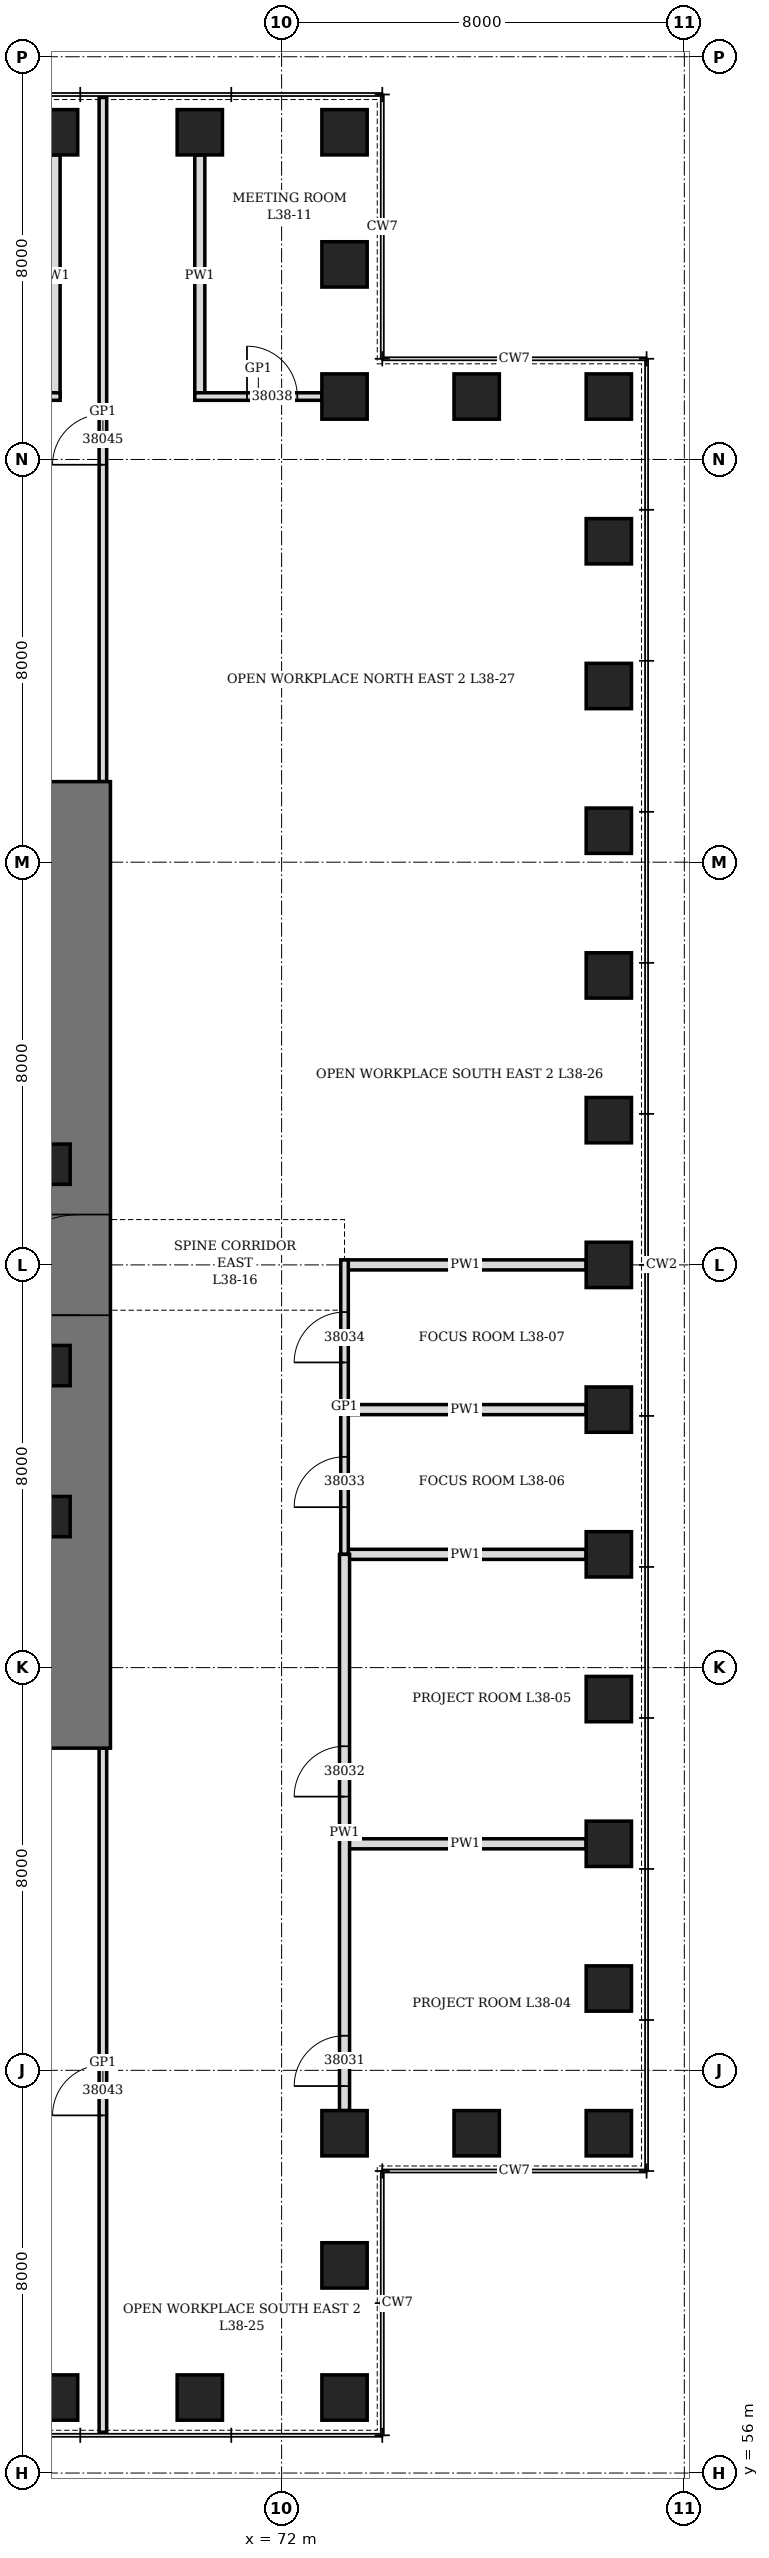
"""IFC4 building model, lengths in metres.
Left out: names, types, materials, properties, quantities, classifications, styles, units other than length and angle.
Written with IfcOpenShell. Run it as: python <this file> out.ifc"""

import sys

from ifc_helpers import new_model, si_unit, direction, frame, frame_2d, origin, origin_2d, place, context, subcontext, project, spatial, rectangle, hollow_rectangle, extrude, element, fill, save


model = new_model("IFC4")
c1 = context("Model", 3, precision=1e-05, world=origin(), true_north=direction((0.0, 1.0)))
c2 = subcontext(c1, "Body", "Model", "MODEL_VIEW")
j1 = project(units=[si_unit("LENGTHUNIT", "METRE"), si_unit("PLANEANGLEUNIT", "RADIAN")], contexts=[c1])
p1 = place(None, origin())
s1 = spatial("IfcSite", under=j1, at=p1, CompositionType="ELEMENT")
p2 = place(p1, origin())
s2 = spatial("IfcBuilding", under=s1, at=p2, CompositionType="ELEMENT")
p3 = place(p2, frame((0.0, 0.0, 171.1)))
s3 = spatial("IfcBuildingStorey", under=s2, at=p3, CompositionType="ELEMENT", Elevation=171.1)
for number, where, z_axis, x_axis in (
    (1, (67.5, 57.5, 0.0), (0.0, 0.0, 1.0), (1.0, 0.0, 0.0)),
    (2, (70.375, 57.5, 0.0), (0.0, 0.0, 1.0), (1.0, 0.0, 0.0)),
    (3, (73.25, 57.5, 0.0), (0.0, 0.0, 1.0), (0.0, 1.0, 0.0)),
    (4, (73.25, 60.125, 0.0), (0.0, 0.0, 1.0), (0.0, 1.0, 0.0)),
    (5, (73.25, 62.75, 0.0), (0.0, 0.0, 1.0), (1.0, 0.0, 0.0)),
    (6, (75.875, 62.75, 0.0), (0.0, 0.0, 1.0), (1.0, 0.0, 0.0)),
    (7, (78.5, 62.75, 0.0), (0.0, 0.0, 1.0), (0.0, 1.0, 0.0)),
    (8, (78.5, 65.625, 0.0), (0.0, 0.0, 1.0), (0.0, 1.0, 0.0)),
    (9, (78.5, 68.5, 0.0), (0.0, 0.0, 1.0), (0.0, 1.0, 0.0)),
    (10, (78.5, 71.375, 0.0), (0.0, 0.0, 1.0), (0.0, 1.0, 0.0)),
    (11, (78.5, 74.25, 0.0), (0.0, 0.0, 1.0), (0.0, 1.0, 0.0)),
    (12, (78.5, 77.125, 0.0), (0.0, 0.0, 1.0), (0.0, 1.0, 0.0)),
    (13, (78.5, 80.0, 0.0), (0.0, 0.0, 1.0), (0.0, 1.0, 0.0)),
    (14, (78.5, 82.875, 0.0), (0.0, 0.0, 1.0), (0.0, 1.0, 0.0)),
    (15, (78.5, 85.75, 0.0), (0.0, 0.0, 1.0), (0.0, 1.0, 0.0)),
    (16, (78.5, 88.625, 0.0), (0.0, 0.0, 1.0), (0.0, 1.0, 0.0)),
    (17, (78.5, 91.5, 0.0), (0.0, 0.0, 1.0), (0.0, 1.0, 0.0)),
    (18, (78.5, 94.375, 0.0), (0.0, 0.0, 1.0), (0.0, 1.0, 0.0)),
    (19, (78.5, 97.25, 0.0), (0.0, 0.0, 1.0), (1.0, 0.0, 0.0)),
    (20, (75.875, 97.25, 0.0), (0.0, 0.0, 1.0), (1.0, 0.0, 0.0)),
    (21, (73.25, 97.25, 0.0), (0.0, 0.0, 1.0), (0.0, 1.0, 0.0)),
    (22, (73.25, 99.875, 0.0), (0.0, 0.0, 1.0), (0.0, 1.0, 0.0)),
    (23, (73.25, 102.5, 0.0), (0.0, 0.0, 1.0), (1.0, 0.0, 0.0)),
    (24, (70.375, 102.5, 0.0), (0.0, 0.0, 1.0), (1.0, 0.0, 0.0)),
    (25, (67.5, 102.5, 0.0), (0.0, 0.0, 1.0), (1.0, 0.0, 0.0)),
):
    element("IfcColumn", number, at=place(p3, frame(where, z_axis=z_axis, x_axis=x_axis)), inside=s3, PredefinedType="COLUMN", context=c2, shape_type="SweptSolid", body=[
        extrude(hollow_rectangle(XDim=0.9, YDim=0.9, WallThickness=0.12, at=origin_2d()), origin(), (0.0, 0.0, 1.0), 4.2),
    ])
p4 = place(p3, frame((68.0, 70.4, 0.0), z_axis=(0.0, 0.0, 1.0), x_axis=(0.0, 1.0, 0.0)))
e26 = element("IfcWall", 26, at=p4, inside=s3, PredefinedType="SHEAR", context=c2, shape_type="SweptSolid", body=[
    extrude(rectangle(XDim=19.2, YDim=1.2, at=frame_2d((9.6, 0.0))), origin(), (0.0, 0.0, 1.0), 4.2),
])
p5 = place(p4, frame((8.6, 0.0, 0.0)))
e27 = element("IfcOpeningElement", 27, at=p5, cuts=e26, PredefinedType="OPENING", context=c2, shape_type="SweptSolid", body=[
    extrude(rectangle(XDim=2.0, YDim=2.4, at=frame_2d((1.0, 1.2))), frame((0.0, 0.61, 0.0), z_axis=(0.0, -1.0, 0.0), x_axis=(1.0, 0.0, 0.0)), (0.0, 0.0, 1.0), 1.22),
])
for number, where, z_axis, x_axis in (
    (28, (67.4, 75.0, 0.0), (0.0, 0.0, 1.0), (1.0, 0.0, 0.0)),
    (29, (67.4, 78.0, 0.0), (0.0, 0.0, 1.0), (1.0, 0.0, 0.0)),
    (30, (67.4, 82.0, 0.0), (0.0, 0.0, 1.0), (1.0, 0.0, 0.0)),
):
    element("IfcColumn", number, at=place(p3, frame(where, z_axis=z_axis, x_axis=x_axis)), inside=s3, PredefinedType="COLUMN", context=c2, shape_type="SweptSolid", body=[
        extrude(hollow_rectangle(XDim=0.8, YDim=0.8, WallThickness=0.1, at=origin_2d()), origin(), (0.0, 0.0, 1.0), 4.2),
    ])
for number, where, z_axis, x_axis in (
    (31, (73.25, 68.5, 0.0), (0.0, 0.0, 1.0), (1.0, 0.0, 0.0)),
    (32, (73.25, 74.25, 0.0), (0.0, 0.0, 1.0), (1.0, 0.0, 0.0)),
    (33, (73.25, 77.125, 0.0), (0.0, 0.0, 1.0), (1.0, 0.0, 0.0)),
    (34, (73.25, 80.0, 0.0), (0.0, 0.0, 1.0), (1.0, 0.0, 0.0)),
):
    element("IfcWall", number, at=place(p3, frame(where, z_axis=z_axis, x_axis=x_axis)), inside=s3, PredefinedType="PARTITIONING", context=c2, shape_type="SweptSolid", body=[
        extrude(rectangle(XDim=4.8, YDim=0.2, at=frame_2d((2.4, 0.0))), origin(), (0.0, 0.0, 1.0), 3.188),
    ])
p6 = place(p3, frame((67.5, 97.25, 0.0), z_axis=(0.0, 0.0, 1.0), x_axis=(0.0, 1.0, 0.0)))
e35 = element("IfcWall", 35, at=p6, inside=s3, PredefinedType="PARTITIONING", context=c2, shape_type="SweptSolid", body=[
    extrude(rectangle(XDim=4.8, YDim=0.2, at=frame_2d((2.4, 0.0))), origin(), (0.0, 0.0, 1.0), 2.65),
])
p7 = place(p3, frame((70.375, 97.25, 0.0), z_axis=(0.0, 0.0, 1.0), x_axis=(0.0, 1.0, 0.0)))
e36 = element("IfcWall", 36, at=p7, inside=s3, PredefinedType="PARTITIONING", context=c2, shape_type="SweptSolid", body=[
    extrude(rectangle(XDim=4.8, YDim=0.2, at=frame_2d((2.4, 0.0))), origin(), (0.0, 0.0, 1.0), 3.188),
])
p8 = place(p3, frame((39.2, 97.25, 0.0), z_axis=(0.0, 0.0, 1.0), x_axis=(1.0, 0.0, 0.0)))
e37 = element("IfcWall", 37, at=p8, inside=s3, PredefinedType="PARTITIONING", context=c2, shape_type="SweptSolid", body=[
    extrude(rectangle(XDim=28.4, YDim=0.15, at=frame_2d((14.2, 0.0))), origin(), (0.0, 0.0, 1.0), 3.95),
])
p9 = place(p8, frame((3.05, 0.0, 0.0)))
e38 = element("IfcOpeningElement", 38, at=p9, cuts=e37, PredefinedType="OPENING", context=c2, shape_type="SweptSolid", body=[
    extrude(rectangle(XDim=1.0, YDim=2.4, at=frame_2d((0.5, 1.2))), frame((0.0, 0.085, 0.0), z_axis=(0.0, -1.0, 0.0), x_axis=(1.0, 0.0, 0.0)), (0.0, 0.0, 1.0), 0.17),
])
p10 = place(p8, frame((14.863, 0.0, 0.0)))
e39 = element("IfcOpeningElement", 39, at=p10, cuts=e37, PredefinedType="OPENING", context=c2, shape_type="SweptSolid", body=[
    extrude(rectangle(XDim=1.0, YDim=2.4, at=frame_2d((0.5, 1.2))), frame((0.0, 0.085, 0.0), z_axis=(0.0, -1.0, 0.0), x_axis=(1.0, 0.0, 0.0)), (0.0, 0.0, 1.0), 0.17),
])
p11 = place(p8, frame((23.488, 0.0, 0.0)))
e40 = element("IfcOpeningElement", 40, at=p11, cuts=e37, PredefinedType="OPENING", context=c2, shape_type="SweptSolid", body=[
    extrude(rectangle(XDim=1.0, YDim=2.1, at=frame_2d((0.5, 1.05))), frame((0.0, 0.085, 0.0), z_axis=(0.0, -1.0, 0.0), x_axis=(1.0, 0.0, 0.0)), (0.0, 0.0, 1.0), 0.17),
])
p12 = place(p3, frame((70.275, 97.25, 0.0), z_axis=(0.0, 0.0, 1.0), x_axis=(1.0, 0.0, 0.0)))
e41 = element("IfcWall", 41, at=p12, inside=s3, PredefinedType="PARTITIONING", context=c2, shape_type="SweptSolid", body=[
    extrude(rectangle(XDim=2.525, YDim=0.15, at=frame_2d((1.263, 0.0))), origin(), (0.0, 0.0, 1.0), 3.95),
])
p13 = place(p12, frame((1.038, 0.0, 0.0)))
e42 = element("IfcOpeningElement", 42, at=p13, cuts=e41, PredefinedType="OPENING", context=c2, shape_type="SweptSolid", body=[
    extrude(rectangle(XDim=1.0, YDim=2.4, at=frame_2d((0.5, 1.2))), frame((0.0, 0.085, 0.0), z_axis=(0.0, -1.0, 0.0), x_axis=(1.0, 0.0, 0.0)), (0.0, 0.0, 1.0), 0.17),
])
p14 = place(p3, frame((68.45, 56.81, 0.0), z_axis=(0.0, 0.0, 1.0), x_axis=(0.0, 1.0, 0.0)))
e43 = element("IfcWall", 43, at=p14, inside=s3, PredefinedType="PARTITIONING", context=c2, shape_type="SweptSolid", body=[
    extrude(rectangle(XDim=13.59, YDim=0.15, at=frame_2d((6.795, 0.0))), origin(), (0.0, 0.0, 1.0), 3.95),
])
p15 = place(p14, frame((6.295, 0.0, 0.0)))
e44 = element("IfcOpeningElement", 44, at=p15, cuts=e43, PredefinedType="OPENING", context=c2, shape_type="SweptSolid", body=[
    extrude(rectangle(XDim=1.0, YDim=2.4, at=frame_2d((0.5, 1.2))), frame((0.0, 0.085, 0.0), z_axis=(0.0, -1.0, 0.0), x_axis=(1.0, 0.0, 0.0)), (0.0, 0.0, 1.0), 0.17),
])
p16 = place(p3, frame((68.45, 89.6, 0.0), z_axis=(0.0, 0.0, 1.0), x_axis=(0.0, 1.0, 0.0)))
e45 = element("IfcWall", 45, at=p16, inside=s3, PredefinedType="PARTITIONING", context=c2, shape_type="SweptSolid", body=[
    extrude(rectangle(XDim=13.59, YDim=0.15, at=frame_2d((6.795, 0.0))), origin(), (0.0, 0.0, 1.0), 3.95),
])
p17 = place(p16, frame((6.295, 0.0, 0.0)))
e46 = element("IfcOpeningElement", 46, at=p17, cuts=e45, PredefinedType="OPENING", context=c2, shape_type="SweptSolid", body=[
    extrude(rectangle(XDim=1.0, YDim=2.4, at=frame_2d((0.5, 1.2))), frame((0.0, 0.085, 0.0), z_axis=(0.0, -1.0, 0.0), x_axis=(1.0, 0.0, 0.0)), (0.0, 0.0, 1.0), 0.17),
])
p18 = place(p3, frame((73.25, 74.25, 0.0), z_axis=(0.0, 0.0, 1.0), x_axis=(0.0, 1.0, 0.0)))
e47 = element("IfcWall", 47, at=p18, inside=s3, PredefinedType="PARTITIONING", context=c2, shape_type="SweptSolid", body=[
    extrude(rectangle(XDim=5.85, YDim=0.15, at=frame_2d((2.925, 0.0))), origin(), (0.0, 0.0, 1.0), 3.95),
])
p19 = place(p18, frame((0.938, 0.0, 0.0)))
e48 = element("IfcOpeningElement", 48, at=p19, cuts=e47, PredefinedType="OPENING", context=c2, shape_type="SweptSolid", body=[
    extrude(rectangle(XDim=1.0, YDim=2.4, at=frame_2d((0.5, 1.2))), frame((0.0, 0.085, 0.0), z_axis=(0.0, -1.0, 0.0), x_axis=(1.0, 0.0, 0.0)), (0.0, 0.0, 1.0), 0.17),
])
p20 = place(p18, frame((3.812, 0.0, 0.0)))
e49 = element("IfcOpeningElement", 49, at=p20, cuts=e47, PredefinedType="OPENING", context=c2, shape_type="SweptSolid", body=[
    extrude(rectangle(XDim=1.0, YDim=2.4, at=frame_2d((0.5, 1.2))), frame((0.0, 0.085, 0.0), z_axis=(0.0, -1.0, 0.0), x_axis=(1.0, 0.0, 0.0)), (0.0, 0.0, 1.0), 0.17),
])
p21 = place(p3, frame((73.25, 63.2, 0.0), z_axis=(0.0, 0.0, 1.0), x_axis=(0.0, 1.0, 0.0)))
e50 = element("IfcWall", 50, at=p21, inside=s3, PredefinedType="PARTITIONING", context=c2, shape_type="SweptSolid", body=[
    extrude(rectangle(XDim=11.05, YDim=0.2, at=frame_2d((5.525, 0.0))), origin(), (0.0, 0.0, 1.0), 3.95),
])
p22 = place(p21, frame((0.488, 0.0, 0.0)))
e51 = element("IfcOpeningElement", 51, at=p22, cuts=e50, PredefinedType="OPENING", context=c2, shape_type="SweptSolid", body=[
    extrude(rectangle(XDim=1.0, YDim=2.1, at=frame_2d((0.5, 1.05))), frame((0.0, 0.11, 0.0), z_axis=(0.0, -1.0, 0.0), x_axis=(1.0, 0.0, 0.0)), (0.0, 0.0, 1.0), 0.22),
])
p23 = place(p21, frame((6.238, 0.0, 0.0)))
e52 = element("IfcOpeningElement", 52, at=p23, cuts=e50, PredefinedType="OPENING", context=c2, shape_type="SweptSolid", body=[
    extrude(rectangle(XDim=1.0, YDim=2.1, at=frame_2d((0.5, 1.05))), frame((0.0, 0.11, 0.0), z_axis=(0.0, -1.0, 0.0), x_axis=(1.0, 0.0, 0.0)), (0.0, 0.0, 1.0), 0.22),
])
p24 = place(p5, origin())
e53 = element("IfcDoor", 53, at=p24, inside=s3, OperationType="DOUBLE_DOOR_SINGLE_SWING", PredefinedType="DOOR", context=c2, shape_type="SweptSolid", body=[
    extrude(rectangle(XDim=2.0, YDim=2.4, at=frame_2d((1.0, 1.2))), frame((0.0, 0.35, 0.0), z_axis=(0.0, -1.0, 0.0), x_axis=(1.0, 0.0, 0.0)), (0.0, 0.0, 1.0), 0.7),
])
fill(e27, e53)
p25 = place(p22, origin())
e54 = element("IfcDoor", 54, at=p25, inside=s3, OperationType="SINGLE_SWING_LEFT", PredefinedType="DOOR", context=c2, shape_type="SweptSolid", body=[
    extrude(rectangle(XDim=1.0, YDim=2.1, at=frame_2d((0.5, 1.05))), frame((0.0, 0.1, 0.0), z_axis=(0.0, -1.0, 0.0), x_axis=(1.0, 0.0, 0.0)), (0.0, 0.0, 1.0), 0.199),
])
fill(e51, e54)
p26 = place(p23, origin())
e55 = element("IfcDoor", 55, at=p26, inside=s3, OperationType="SINGLE_SWING_LEFT", PredefinedType="DOOR", context=c2, shape_type="SweptSolid", body=[
    extrude(rectangle(XDim=1.0, YDim=2.1, at=frame_2d((0.5, 1.05))), frame((0.0, 0.1, 0.0), z_axis=(0.0, -1.0, 0.0), x_axis=(1.0, 0.0, 0.0)), (0.0, 0.0, 1.0), 0.199),
])
fill(e52, e55)
p27 = place(p19, origin())
e56 = element("IfcDoor", 56, at=p27, inside=s3, OperationType="SINGLE_SWING_RIGHT", PredefinedType="DOOR", context=c2, shape_type="SweptSolid", body=[
    extrude(rectangle(XDim=1.0, YDim=2.4, at=frame_2d((0.5, 1.2))), frame((0.0, 0.075, 0.0), z_axis=(0.0, -1.0, 0.0), x_axis=(1.0, 0.0, 0.0)), (0.0, 0.0, 1.0), 0.149),
])
fill(e48, e56)
p28 = place(p20, origin())
e57 = element("IfcDoor", 57, at=p28, inside=s3, OperationType="SINGLE_SWING_RIGHT", PredefinedType="DOOR", context=c2, shape_type="SweptSolid", body=[
    extrude(rectangle(XDim=1.0, YDim=2.4, at=frame_2d((0.5, 1.2))), frame((0.0, 0.075, 0.0), z_axis=(0.0, -1.0, 0.0), x_axis=(1.0, 0.0, 0.0)), (0.0, 0.0, 1.0), 0.149),
])
fill(e49, e57)
p29 = place(p13, origin())
e58 = element("IfcDoor", 58, at=p29, inside=s3, OperationType="SINGLE_SWING_RIGHT", PredefinedType="DOOR", context=c2, shape_type="SweptSolid", body=[
    extrude(rectangle(XDim=1.0, YDim=2.4, at=frame_2d((0.5, 1.2))), frame((0.0, 0.075, 0.0), z_axis=(0.0, -1.0, 0.0), x_axis=(1.0, 0.0, 0.0)), (0.0, 0.0, 1.0), 0.149),
])
fill(e42, e58)
p30 = place(p15, origin())
e59 = element("IfcDoor", 59, at=p30, inside=s3, OperationType="SINGLE_SWING_RIGHT", PredefinedType="DOOR", context=c2, shape_type="SweptSolid", body=[
    extrude(rectangle(XDim=1.0, YDim=2.4, at=frame_2d((0.5, 1.2))), frame((0.0, 0.075, 0.0), z_axis=(0.0, -1.0, 0.0), x_axis=(1.0, 0.0, 0.0)), (0.0, 0.0, 1.0), 0.149),
])
fill(e44, e59)
p31 = place(p17, origin())
e60 = element("IfcDoor", 60, at=p31, inside=s3, OperationType="SINGLE_SWING_RIGHT", PredefinedType="DOOR", context=c2, shape_type="SweptSolid", body=[
    extrude(rectangle(XDim=1.0, YDim=2.4, at=frame_2d((0.5, 1.2))), frame((0.0, 0.075, 0.0), z_axis=(0.0, -1.0, 0.0), x_axis=(1.0, 0.0, 0.0)), (0.0, 0.0, 1.0), 0.149),
])
fill(e46, e60)
save(model, sys.argv[1])
